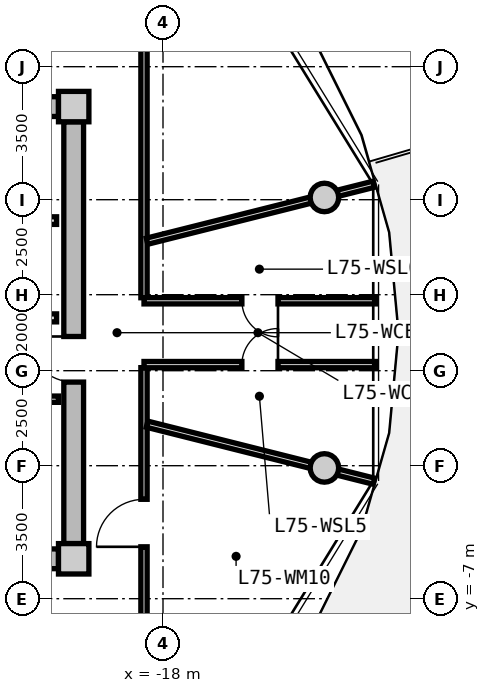
"""IFC4 building model, lengths in metres.
Left out: names, types, materials, properties, quantities, classifications, styles, units other than length and angle.
Written with IfcOpenShell. Run it as: python <this file> out.ifc"""

import sys

from ifc_helpers import new_model, si_unit, direction, frame, frame_2d, origin, origin_2d, place, context, subcontext, project, spatial, rectangle, circle, extrude, source, transform, mapped, element, fill, save


model = new_model("IFC4")
c1 = context("Model", 3, precision=1e-05, world=origin(), true_north=direction((0.0, 1.0)))
c2 = subcontext(c1, "Body", "Model", "MODEL_VIEW")
j1 = project(units=[si_unit("LENGTHUNIT", "METRE"), si_unit("PLANEANGLEUNIT", "RADIAN")], contexts=[c1])
p1 = place(None, origin())
s1 = spatial("IfcSite", under=j1, at=p1, CompositionType="ELEMENT")
p2 = place(p1, origin())
s2 = spatial("IfcBuilding", under=s1, at=p2, CompositionType="ELEMENT")
p3 = place(p2, frame((0.0, 0.0, 241.35)))
s3 = spatial("IfcBuildingStorey", under=s2, at=p3, CompositionType="ELEMENT", Elevation=241.35)
m1 = source(origin(), c2, "Body", "SweptSolid", [
    extrude(rectangle(XDim=0.8, YDim=0.8, at=origin_2d()), origin(), (0.0, 0.0, 1.0), 3.05),
])
for number, where, z_axis, x_axis in (
    (1, (-20.35, -5.95, 0.0), (0.0, 0.0, 1.0), (1.0, 0.0, 0.0)),
    (2, (-20.35, 5.95, 0.0), (0.0, 0.0, 1.0), (1.0, 0.0, 0.0)),
):
    element("IfcColumn", number, at=place(p3, frame(where, z_axis=z_axis, x_axis=x_axis)), inside=s3, PredefinedType="COLUMN", context=c2, shape_type="MappedRepresentation", body=[
        mapped(m1, transform((0.0, 0.0, 0.0), x_axis=(1.0, 0.0, 0.0), y_axis=(0.0, 1.0, 0.0), z_axis=(0.0, 0.0, 1.0), scale=1.0)),
    ])
m2 = source(origin(), c2, "Body", "SweptSolid", [
    extrude(rectangle(XDim=14.5, YDim=0.52, at=frame_2d((7.25, 0.0))), origin(), (0.0, 0.0, 1.0), 2.73),
])
for number, where, z_axis, x_axis in (
    (3, (-35.25, 5.95, 0.0), (0.0, 0.0, 1.0), (1.0, 0.0, 0.0)),
    (4, (-20.75, -5.95, 0.0), (0.0, 0.0, 1.0), (-1.0, 0.0, 0.0)),
):
    element("IfcWall", number, at=place(p3, frame(where, z_axis=z_axis, x_axis=x_axis)), inside=s3, PredefinedType="SHEAR", context=c2, shape_type="MappedRepresentation", body=[
        mapped(m2, transform((0.0, 0.0, 0.0), x_axis=(1.0, 0.0, 0.0), y_axis=(0.0, 1.0, 0.0), z_axis=(0.0, 0.0, 1.0), scale=1.0)),
    ])
m3 = source(origin(), c2, "Body", "SweptSolid", [
    extrude(rectangle(XDim=11.1, YDim=0.52, at=frame_2d((5.55, 0.0))), origin(), (0.0, 0.0, 1.0), 2.73),
])
p4 = place(p3, frame((-20.35, 5.55, 0.0), z_axis=(0.0, 0.0, 1.0), x_axis=(0.0, -1.0, 0.0)))
e5 = element("IfcWall", 5, at=p4, inside=s3, PredefinedType="SHEAR", context=c2, shape_type="MappedRepresentation", body=[
    mapped(m3, transform((0.0, 0.0, 0.0), x_axis=(1.0, 0.0, 0.0), y_axis=(0.0, 1.0, 0.0), z_axis=(0.0, 0.0, 1.0), scale=1.0)),
])
p5 = place(p4, frame((5.65, 0.0, 0.0)))
e6 = element("IfcOpeningElement", 6, at=p5, cuts=e5, PredefinedType="OPENING", context=c2, shape_type="SweptSolid", body=[
    extrude(rectangle(XDim=1.2, YDim=2.15, at=frame_2d((0.6, 1.075))), frame((0.0, 0.27, 0.0), z_axis=(0.0, -1.0, 0.0), x_axis=(1.0, 0.0, 0.0)), (0.0, 0.0, 1.0), 0.54),
])
m4 = source(origin(), c2, "Body", "SweptSolid", [
    extrude(circle(Radius=0.375, at=origin_2d()), origin(), (0.0, 0.0, 1.0), 3.05),
])
for number, where, z_axis, x_axis in (
    (7, (-13.753, 3.559, 0.0), (0.0, 0.0, 1.0), (1.0, 0.0, 0.0)),
    (8, (-13.753, -3.559, 0.0), (0.0, 0.0, 1.0), (1.0, 0.0, 0.0)),
):
    element("IfcColumn", number, at=place(p3, frame(where, z_axis=z_axis, x_axis=x_axis)), inside=s3, PredefinedType="COLUMN", context=c2, shape_type="MappedRepresentation", body=[
        mapped(m4, transform((0.0, 0.0, 0.0), x_axis=(1.0, 0.0, 0.0), y_axis=(0.0, 1.0, 0.0), z_axis=(0.0, 0.0, 1.0), scale=1.0)),
    ])
m5 = source(origin(), c2, "Body", "SweptSolid", [
    extrude(rectangle(XDim=3.2, YDim=0.2, at=frame_2d((1.6, 0.0))), origin(), (0.0, 0.0, 1.0), 2.715),
])
p6 = place(p3, frame((-24.0, 2.95, 0.0), z_axis=(0.0, 0.0, 1.0), x_axis=(1.0, 0.0, 0.0)))
e9 = element("IfcWall", 9, at=p6, inside=s3, PredefinedType="PARTITIONING", context=c2, shape_type="MappedRepresentation", body=[
    mapped(m5, transform((0.0, 0.0, 0.0), x_axis=(1.0, 0.0, 0.0), y_axis=(0.0, 1.0, 0.0), z_axis=(0.0, 0.0, 1.0), scale=1.0)),
])
m6 = source(origin(), c2, "Body", "SweptSolid", [
    extrude(rectangle(XDim=6.66, YDim=0.21, at=frame_2d((3.33, 0.0))), origin(), (0.0, 0.0, 1.0), 2.715),
])
p7 = place(p3, frame((-27.46, 0.39, 0.0), z_axis=(0.0, 0.0, 1.0), x_axis=(1.0, 0.0, 0.0)))
e10 = element("IfcWall", 10, at=p7, inside=s3, PredefinedType="PARTITIONING", context=c2, shape_type="MappedRepresentation", body=[
    mapped(m6, transform((0.0, 0.0, 0.0), x_axis=(1.0, 0.0, 0.0), y_axis=(0.0, 1.0, 0.0), z_axis=(0.0, 0.0, 1.0), scale=1.0)),
])
p8 = place(p7, frame((1.0, 0.0, 0.0)))
e11 = element("IfcOpeningElement", 11, at=p8, cuts=e10, PredefinedType="OPENING", context=c2, shape_type="SweptSolid", body=[
    extrude(rectangle(XDim=1.2, YDim=2.15, at=frame_2d((0.6, 1.075))), frame((0.0, 0.115, 0.0), z_axis=(0.0, -1.0, 0.0), x_axis=(1.0, 0.0, 0.0)), (0.0, 0.0, 1.0), 0.23),
])
m7 = source(origin(), c2, "Body", "SweptSolid", [
    extrude(rectangle(XDim=2.7, YDim=0.165, at=frame_2d((1.35, 0.0))), origin(), (0.0, 0.0, 1.0), 2.715),
])
p9 = place(p3, frame((-23.45, -1.75, 0.0), z_axis=(0.0, 0.0, 1.0), x_axis=(1.0, 0.0, 0.0)))
e12 = element("IfcWall", 12, at=p9, inside=s3, PredefinedType="PARTITIONING", context=c2, shape_type="MappedRepresentation", body=[
    mapped(m7, transform((0.0, 0.0, 0.0), x_axis=(1.0, 0.0, 0.0), y_axis=(0.0, 1.0, 0.0), z_axis=(0.0, 0.0, 1.0), scale=1.0)),
])
p10 = place(p9, frame((0.222, 0.0, 0.0)))
e13 = element("IfcOpeningElement", 13, at=p10, cuts=e12, PredefinedType="OPENING", context=c2, shape_type="SweptSolid", body=[
    extrude(rectangle(XDim=0.925, YDim=2.1, at=frame_2d((0.462, 1.05))), frame((0.0, 0.093, 0.0), z_axis=(0.0, -1.0, 0.0), x_axis=(1.0, 0.0, 0.0)), (0.0, 0.0, 1.0), 0.185),
])
p11 = place(p9, frame((1.522, 0.0, 0.0)))
e14 = element("IfcOpeningElement", 14, at=p11, cuts=e12, PredefinedType="OPENING", context=c2, shape_type="SweptSolid", body=[
    extrude(rectangle(XDim=0.925, YDim=2.1, at=frame_2d((0.462, 1.05))), frame((0.0, 0.093, 0.0), z_axis=(0.0, -1.0, 0.0), x_axis=(1.0, 0.0, 0.0)), (0.0, 0.0, 1.0), 0.185),
])
m8 = source(origin(), c2, "Body", "SweptSolid", [
    extrude(rectangle(XDim=6.88, YDim=0.165, at=frame_2d((3.44, 0.0))), origin(), (0.0, 0.0, 1.0), 2.715),
])
p12 = place(p3, frame((-18.5, 7.8, 0.0), z_axis=(0.0, 0.0, 1.0), x_axis=(0.0, -1.0, 0.0)))
e15 = element("IfcWall", 15, at=p12, inside=s3, PredefinedType="PARTITIONING", context=c2, shape_type="MappedRepresentation", body=[
    mapped(m8, transform((0.0, 0.0, 0.0), x_axis=(1.0, 0.0, 0.0), y_axis=(0.0, 1.0, 0.0), z_axis=(0.0, 0.0, 1.0), scale=1.0)),
])
p13 = place(p3, frame((-18.5, -0.92, 0.0), z_axis=(0.0, 0.0, 1.0), x_axis=(0.0, -1.0, 0.0)))
e16 = element("IfcWall", 16, at=p13, inside=s3, PredefinedType="PARTITIONING", context=c2, shape_type="MappedRepresentation", body=[
    mapped(m8, transform((0.0, 0.0, 0.0), x_axis=(1.0, 0.0, 0.0), y_axis=(0.0, 1.0, 0.0), z_axis=(0.0, 0.0, 1.0), scale=1.0)),
])
p14 = place(p13, frame((3.464, 0.0, 0.0)))
e17 = element("IfcOpeningElement", 17, at=p14, cuts=e16, PredefinedType="OPENING", context=c2, shape_type="SweptSolid", body=[
    extrude(rectangle(XDim=1.25, YDim=2.2, at=frame_2d((0.625, 1.1))), frame((0.0, 0.093, 0.0), z_axis=(0.0, -1.0, 0.0), x_axis=(1.0, 0.0, 0.0)), (0.0, 0.0, 1.0), 0.185),
])
m9 = source(origin(), c2, "Body", "SweptSolid", [
    extrude(rectangle(XDim=6.157, YDim=0.165, at=frame_2d((3.079, 0.0))), origin(), (0.0, 0.0, 1.0), 2.315),
])
for number, where, z_axis, x_axis in (
    (18, (-18.42, -2.407, 0.0), (0.0, 0.0, 1.0), (0.97, -0.244, 0.0)),
    (19, (-18.42, 2.407, 0.0), (0.0, 0.0, 1.0), (0.97, 0.244, 0.0)),
):
    element("IfcWall", number, at=place(p3, frame(where, z_axis=z_axis, x_axis=x_axis)), inside=s3, PredefinedType="PARTITIONING", context=c2, shape_type="MappedRepresentation", body=[
        mapped(m9, transform((0.0, 0.0, 0.0), x_axis=(1.0, 0.0, 0.0), y_axis=(0.0, 1.0, 0.0), z_axis=(0.0, 0.0, 1.0), scale=1.0)),
    ])
m10 = source(origin(), c2, "Body", "SweptSolid", [
    extrude(rectangle(XDim=6.101, YDim=0.165, at=frame_2d((3.051, 0.0))), origin(), (0.0, 0.0, 1.0), 2.715),
])
p15 = place(p3, frame((-18.5, 0.84, 0.0), z_axis=(0.0, 0.0, 1.0), x_axis=(1.0, 0.0, 0.0)))
e20 = element("IfcWall", 20, at=p15, inside=s3, PredefinedType="PARTITIONING", context=c2, shape_type="MappedRepresentation", body=[
    mapped(m10, transform((0.0, 0.0, 0.0), x_axis=(1.0, 0.0, 0.0), y_axis=(0.0, 1.0, 0.0), z_axis=(0.0, 0.0, 1.0), scale=1.0)),
])
p16 = place(p15, frame((2.576, 0.0, 0.0)))
e21 = element("IfcOpeningElement", 21, at=p16, cuts=e20, PredefinedType="OPENING", context=c2, shape_type="SweptSolid", body=[
    extrude(rectangle(XDim=0.95, YDim=2.1, at=frame_2d((0.475, 1.05))), frame((0.0, 0.093, 0.0), z_axis=(0.0, -1.0, 0.0), x_axis=(1.0, 0.0, 0.0)), (0.0, 0.0, 1.0), 0.185),
])
p17 = place(p3, frame((-12.399, -0.84, 0.0), z_axis=(0.0, 0.0, 1.0), x_axis=(-1.0, 0.0, 0.0)))
e22 = element("IfcWall", 22, at=p17, inside=s3, PredefinedType="PARTITIONING", context=c2, shape_type="MappedRepresentation", body=[
    mapped(m10, transform((0.0, 0.0, 0.0), x_axis=(1.0, 0.0, 0.0), y_axis=(0.0, 1.0, 0.0), z_axis=(0.0, 0.0, 1.0), scale=1.0)),
])
p18 = place(p17, frame((2.576, 0.0, 0.0)))
e23 = element("IfcOpeningElement", 23, at=p18, cuts=e22, PredefinedType="OPENING", context=c2, shape_type="SweptSolid", body=[
    extrude(rectangle(XDim=0.95, YDim=2.1, at=frame_2d((0.475, 1.05))), frame((0.0, 0.093, 0.0), z_axis=(0.0, -1.0, 0.0), x_axis=(1.0, 0.0, 0.0)), (0.0, 0.0, 1.0), 0.185),
])
m11 = source(origin(), c2, "Body", "SweptSolid", [
    extrude(rectangle(XDim=1.2, YDim=2.15, at=frame_2d((0.6, 1.075))), frame((0.0, 0.025, 0.0), z_axis=(0.0, -1.0, 0.0), x_axis=(1.0, 0.0, 0.0)), (0.0, 0.0, 1.0), 0.05),
])
p19 = place(p5, frame((1.2, 0.0, 0.0), z_axis=(0.0, 0.0, 1.0), x_axis=(-1.0, 0.0, 0.0)))
e24 = element("IfcDoor", 24, at=p19, inside=s3, OperationType="SINGLE_SWING_RIGHT", PredefinedType="DOOR", context=c2, shape_type="MappedRepresentation", body=[
    mapped(m11, transform((0.0, 0.0, 0.0), x_axis=(1.0, 0.0, 0.0), y_axis=(0.0, 1.0, 0.0), z_axis=(0.0, 0.0, 1.0), scale=1.0)),
])
fill(e6, e24)
m12 = source(origin(), c2, "Body", "SweptSolid", [
    extrude(rectangle(XDim=0.95, YDim=2.1, at=frame_2d((0.475, 1.05))), frame((0.0, 0.025, 0.0), z_axis=(0.0, -1.0, 0.0), x_axis=(1.0, 0.0, 0.0)), (0.0, 0.0, 1.0), 0.05),
])
p20 = place(p18, frame((0.95, 0.0, 0.0), z_axis=(0.0, 0.0, 1.0), x_axis=(-1.0, 0.0, 0.0)))
e25 = element("IfcDoor", 25, at=p20, inside=s3, OperationType="SINGLE_SWING_RIGHT", PredefinedType="DOOR", context=c2, shape_type="MappedRepresentation", body=[
    mapped(m12, transform((0.0, 0.0, 0.0), x_axis=(1.0, 0.0, 0.0), y_axis=(0.0, 1.0, 0.0), z_axis=(0.0, 0.0, 1.0), scale=1.0)),
])
fill(e23, e25)
p21 = place(p16, frame((0.95, 0.0, 0.0), z_axis=(0.0, 0.0, 1.0), x_axis=(-1.0, 0.0, 0.0)))
e26 = element("IfcDoor", 26, at=p21, inside=s3, OperationType="SINGLE_SWING_LEFT", PredefinedType="DOOR", context=c2, shape_type="MappedRepresentation", body=[
    mapped(m12, transform((0.0, 0.0, 0.0), x_axis=(1.0, 0.0, 0.0), y_axis=(0.0, 1.0, 0.0), z_axis=(0.0, 0.0, 1.0), scale=1.0)),
])
fill(e21, e26)
m13 = source(origin(), c2, "Body", "SweptSolid", [
    extrude(rectangle(XDim=1.25, YDim=2.2, at=frame_2d((0.625, 1.1))), frame((0.0, 0.025, 0.0), z_axis=(0.0, -1.0, 0.0), x_axis=(1.0, 0.0, 0.0)), (0.0, 0.0, 1.0), 0.05),
])
p22 = place(p14, frame((1.25, 0.0, 0.0), z_axis=(0.0, 0.0, 1.0), x_axis=(-1.0, 0.0, 0.0)))
e27 = element("IfcDoor", 27, at=p22, inside=s3, OperationType="SINGLE_SWING_LEFT", PredefinedType="DOOR", context=c2, shape_type="MappedRepresentation", body=[
    mapped(m13, transform((0.0, 0.0, 0.0), x_axis=(1.0, 0.0, 0.0), y_axis=(0.0, 1.0, 0.0), z_axis=(0.0, 0.0, 1.0), scale=1.0)),
])
fill(e17, e27)
save(model, sys.argv[1])
